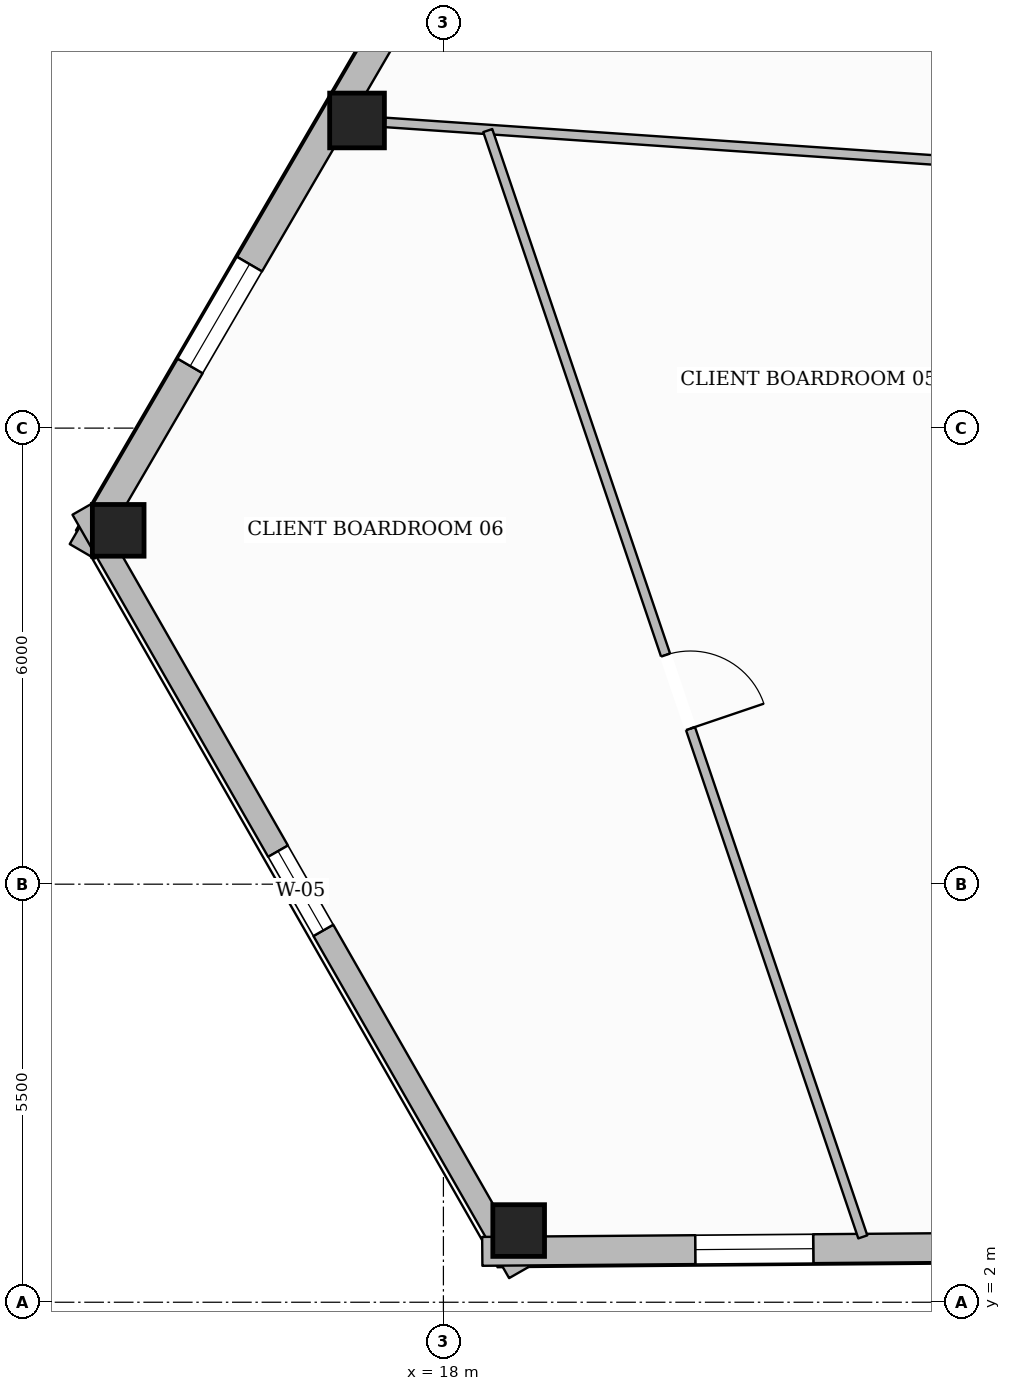
"""IFC4 building model, lengths in metres.
Left out: names, types, materials, properties, quantities, classifications, styles, units other than length and angle.
Written with IfcOpenShell. Run it as: python <this file> out.ifc"""

import sys

from ifc_helpers import new_model, si_unit, direction, frame, frame_2d, origin, origin_2d, place, context, subcontext, project, spatial, rectangle, hollow_rectangle, extrude, element, fill, save


model = new_model("IFC4")
c1 = context("Model", 3, precision=1e-05, world=origin(), true_north=direction((0.0, 1.0)))
c2 = subcontext(c1, "Body", "Model", "MODEL_VIEW")
j1 = project(units=[si_unit("LENGTHUNIT", "METRE"), si_unit("PLANEANGLEUNIT", "RADIAN")], contexts=[c1])
p1 = place(None, origin())
s1 = spatial("IfcSite", under=j1, at=p1, CompositionType="ELEMENT")
p2 = place(p1, origin())
s2 = spatial("IfcBuilding", under=s1, at=p2, CompositionType="ELEMENT")
p3 = place(p2, frame((0.0, 0.0, 147.1)))
s3 = spatial("IfcBuildingStorey", under=s2, at=p3, CompositionType="ELEMENT", Elevation=147.1)
p4 = place(p3, frame((16.864, 17.547, 0.0), z_axis=(0.0, 0.0, 1.0), x_axis=(1.0, 0.0, 0.0)))
e1 = element("IfcColumn", 1, at=p4, inside=s3, PredefinedType="COLUMN", context=c2, shape_type="SweptSolid", body=[
    extrude(hollow_rectangle(XDim=0.72, YDim=0.72, WallThickness=0.032, at=origin_2d()), origin(), (0.0, 0.0, 1.0), 3.6),
])
for number, where, z_axis, x_axis in (
    (2, (13.721, 12.155, 0.0), (0.0, 0.0, 1.0), (1.0, 0.0, 0.0)),
    (3, (18.99, 2.943, 0.0), (0.0, 0.0, 1.0), (1.0, 0.0, 0.0)),
):
    element("IfcColumn", number, at=place(p3, frame(where, z_axis=z_axis, x_axis=x_axis)), inside=s3, PredefinedType="COLUMN", context=c2, shape_type="SweptSolid", body=[
        extrude(hollow_rectangle(XDim=0.68, YDim=0.68, WallThickness=0.03, at=origin_2d()), origin(), (0.0, 0.0, 1.0), 3.6),
    ])
p5 = place(p3, frame((13.248, 11.879, 0.0), z_axis=(0.0, 0.0, 1.0), x_axis=(0.503467320033, 0.864014269361, 0.0)))
e4 = element("IfcWall", 4, at=p5, inside=s3, PredefinedType="STANDARD", context=c2, shape_type="SweptSolid", body=[
    extrude(rectangle(XDim=38.396, YDim=0.38, at=frame_2d((19.198, 0.0))), origin(), (0.0, 0.0, 1.0), 3.059),
])
p6 = place(p5, frame((34.027, 0.0, 0.65)))
e5 = element("IfcOpeningElement", 5, at=p6, cuts=e4, PredefinedType="OPENING", context=c2, shape_type="SweptSolid", body=[
    extrude(rectangle(XDim=1.55, YDim=1.75, at=frame_2d((0.775, 0.875))), frame((0.0, 0.2, 0.0), z_axis=(0.0, -1.0, 0.0), x_axis=(1.0, 0.0, 0.0)), (0.0, 0.0, 1.0), 0.4),
])
p7 = place(p5, frame((27.786, 0.0, 0.65)))
e6 = element("IfcOpeningElement", 6, at=p7, cuts=e4, PredefinedType="OPENING", context=c2, shape_type="SweptSolid", body=[
    extrude(rectangle(XDim=1.55, YDim=1.75, at=frame_2d((0.775, 0.875))), frame((0.0, 0.2, 0.0), z_axis=(0.0, -1.0, 0.0), x_axis=(1.0, 0.0, 0.0)), (0.0, 0.0, 1.0), 0.4),
])
p8 = place(p5, frame((15.304, 0.0, 0.65)))
e7 = element("IfcOpeningElement", 7, at=p8, cuts=e4, PredefinedType="OPENING", context=c2, shape_type="SweptSolid", body=[
    extrude(rectangle(XDim=1.55, YDim=1.75, at=frame_2d((0.775, 0.875))), frame((0.0, 0.2, 0.0), z_axis=(0.0, -1.0, 0.0), x_axis=(1.0, 0.0, 0.0)), (0.0, 0.0, 1.0), 0.4),
])
p9 = place(p5, frame((9.063, 0.0, 0.65)))
e8 = element("IfcOpeningElement", 8, at=p9, cuts=e4, PredefinedType="OPENING", context=c2, shape_type="SweptSolid", body=[
    extrude(rectangle(XDim=1.55, YDim=1.75, at=frame_2d((0.775, 0.875))), frame((0.0, 0.2, 0.0), z_axis=(0.0, -1.0, 0.0), x_axis=(1.0, 0.0, 0.0)), (0.0, 0.0, 1.0), 0.4),
])
p10 = place(p5, frame((2.823, 0.0, 0.65)))
e9 = element("IfcOpeningElement", 9, at=p10, cuts=e4, PredefinedType="OPENING", context=c2, shape_type="SweptSolid", body=[
    extrude(rectangle(XDim=1.55, YDim=1.75, at=frame_2d((0.775, 0.875))), frame((0.0, 0.2, 0.0), z_axis=(0.0, -1.0, 0.0), x_axis=(1.0, 0.0, 0.0)), (0.0, 0.0, 1.0), 0.4),
])
p11 = place(p3, frame((18.995, 2.392, 0.0), z_axis=(0.0, 0.0, 1.0), x_axis=(-0.496472938296, 0.868052199778, 0.0)))
e10 = element("IfcWall", 10, at=p11, inside=s3, PredefinedType="STANDARD", context=c2, shape_type="SweptSolid", body=[
    extrude(rectangle(XDim=11.57, YDim=0.3, at=frame_2d((5.785, 0.0))), origin(), (0.0, 0.0, 1.0), 3.059),
])
p12 = place(p11, frame((5.185, 0.0, 0.65)))
e11 = element("IfcOpeningElement", 11, at=p12, cuts=e10, PredefinedType="OPENING", context=c2, shape_type="SweptSolid", body=[
    extrude(rectangle(XDim=1.2, YDim=1.7, at=frame_2d((0.6, 0.85))), frame((0.0, 0.16, 0.0), z_axis=(0.0, -1.0, 0.0), x_axis=(1.0, 0.0, 0.0)), (0.0, 0.0, 1.0), 0.32),
])
p13 = place(p3, frame((56.643, 2.977, 0.0), z_axis=(0.0, 0.0, 1.0), x_axis=(-0.999967461722, -0.008066938573, 0.0)))
e12 = element("IfcWall", 12, at=p13, inside=s3, PredefinedType="STANDARD", context=c2, shape_type="SweptSolid", body=[
    extrude(rectangle(XDim=38.133, YDim=0.38, at=frame_2d((19.066, 0.0))), origin(), (0.0, 0.0, 1.0), 3.059),
])
p14 = place(p13, frame((33.779, 0.0, 0.65)))
e13 = element("IfcOpeningElement", 13, at=p14, cuts=e12, PredefinedType="OPENING", context=c2, shape_type="SweptSolid", body=[
    extrude(rectangle(XDim=1.55, YDim=1.75, at=frame_2d((0.775, 0.875))), frame((0.0, 0.2, 0.0), z_axis=(0.0, -1.0, 0.0), x_axis=(1.0, 0.0, 0.0)), (0.0, 0.0, 1.0), 0.4),
])
p15 = place(p13, frame((27.583, 0.0, 0.65)))
e14 = element("IfcOpeningElement", 14, at=p15, cuts=e12, PredefinedType="OPENING", context=c2, shape_type="SweptSolid", body=[
    extrude(rectangle(XDim=1.55, YDim=1.75, at=frame_2d((0.775, 0.875))), frame((0.0, 0.2, 0.0), z_axis=(0.0, -1.0, 0.0), x_axis=(1.0, 0.0, 0.0)), (0.0, 0.0, 1.0), 0.4),
])
p16 = place(p13, frame((15.189, 0.0, 0.65)))
e15 = element("IfcOpeningElement", 15, at=p16, cuts=e12, PredefinedType="OPENING", context=c2, shape_type="SweptSolid", body=[
    extrude(rectangle(XDim=1.55, YDim=1.75, at=frame_2d((0.775, 0.875))), frame((0.0, 0.2, 0.0), z_axis=(0.0, -1.0, 0.0), x_axis=(1.0, 0.0, 0.0)), (0.0, 0.0, 1.0), 0.4),
])
p17 = place(p13, frame((8.993, 0.0, 0.65)))
e16 = element("IfcOpeningElement", 16, at=p17, cuts=e12, PredefinedType="OPENING", context=c2, shape_type="SweptSolid", body=[
    extrude(rectangle(XDim=1.55, YDim=1.75, at=frame_2d((0.775, 0.875))), frame((0.0, 0.2, 0.0), z_axis=(0.0, -1.0, 0.0), x_axis=(1.0, 0.0, 0.0)), (0.0, 0.0, 1.0), 0.4),
])
p18 = place(p13, frame((2.796, 0.0, 0.65)))
e17 = element("IfcOpeningElement", 17, at=p18, cuts=e12, PredefinedType="OPENING", context=c2, shape_type="SweptSolid", body=[
    extrude(rectangle(XDim=1.55, YDim=1.75, at=frame_2d((0.775, 0.875))), frame((0.0, 0.2, 0.0), z_axis=(0.0, -1.0, 0.0), x_axis=(1.0, 0.0, 0.0)), (0.0, 0.0, 1.0), 0.4),
])
p19 = place(p3, frame((25.949, 16.925, 0.0), z_axis=(0.0, 0.0, 1.0), x_axis=(-0.997662095491, 0.06833990942, 0.0)))
e18 = element("IfcWall", 18, at=p19, inside=s3, PredefinedType="PARTITIONING", context=c2, shape_type="SweptSolid", body=[
    extrude(rectangle(XDim=8.738, YDim=0.125, at=frame_2d((4.369, 0.0))), origin(), (0.0, 0.0, 1.0), 3.141),
])
p20 = place(p3, frame((18.583, 17.415, 0.0), z_axis=(0.0, 0.0, 1.0), x_axis=(0.321056186339, -0.947060148678, 0.0)))
e19 = element("IfcWall", 19, at=p20, inside=s3, PredefinedType="PARTITIONING", context=c2, shape_type="SweptSolid", body=[
    extrude(rectangle(XDim=15.368, YDim=0.125, at=frame_2d((7.684, 0.0))), origin(), (0.0, 0.0, 1.0), 3.6),
])
p21 = place(p20, frame((7.287, 0.0, 0.0)))
e20 = element("IfcOpeningElement", 20, at=p21, cuts=e19, PredefinedType="OPENING", context=c2, shape_type="SweptSolid", body=[
    extrude(rectangle(XDim=1.02, YDim=2.15, at=frame_2d((0.51, 1.075))), frame((0.0, 0.073, 0.0), z_axis=(0.0, -1.0, 0.0), x_axis=(1.0, 0.0, 0.0)), (0.0, 0.0, 1.0), 0.145),
])
p22 = place(p10, origin())
e21 = element("IfcWindow", 21, at=p22, inside=s3, PartitioningType="SINGLE_PANEL", PredefinedType="WINDOW", context=c2, shape_type="SweptSolid", body=[
    extrude(rectangle(XDim=1.55, YDim=1.75, at=frame_2d((0.775, 0.875))), frame((0.0, 0.03, 0.0), z_axis=(0.0, -1.0, 0.0), x_axis=(1.0, 0.0, 0.0)), (0.0, 0.0, 1.0), 0.06),
])
fill(e9, e21)
p23 = place(p14, origin())
e22 = element("IfcWindow", 22, at=p23, inside=s3, PartitioningType="SINGLE_PANEL", PredefinedType="WINDOW", context=c2, shape_type="SweptSolid", body=[
    extrude(rectangle(XDim=1.55, YDim=1.75, at=frame_2d((0.775, 0.875))), frame((0.0, 0.03, 0.0), z_axis=(0.0, -1.0, 0.0), x_axis=(1.0, 0.0, 0.0)), (0.0, 0.0, 1.0), 0.06),
])
fill(e13, e22)
p24 = place(p12, origin())
e23 = element("IfcWindow", 23, at=p24, inside=s3, PartitioningType="SINGLE_PANEL", PredefinedType="WINDOW", context=c2, shape_type="SweptSolid", body=[
    extrude(rectangle(XDim=1.2, YDim=1.7, at=frame_2d((0.6, 0.85))), frame((0.0, 0.03, 0.0), z_axis=(0.0, -1.0, 0.0), x_axis=(1.0, 0.0, 0.0)), (0.0, 0.0, 1.0), 0.06),
])
fill(e11, e23)
p25 = place(p21, origin())
e24 = element("IfcDoor", 24, at=p25, inside=s3, OperationType="SINGLE_SWING_RIGHT", PredefinedType="DOOR", context=c2, shape_type="SweptSolid", body=[
    extrude(rectangle(XDim=1.02, YDim=2.15, at=frame_2d((0.51, 1.075))), frame((0.0, 0.025, 0.0), z_axis=(0.0, -1.0, 0.0), x_axis=(1.0, 0.0, 0.0)), (0.0, 0.0, 1.0), 0.05),
])
fill(e20, e24)
save(model, sys.argv[1])
